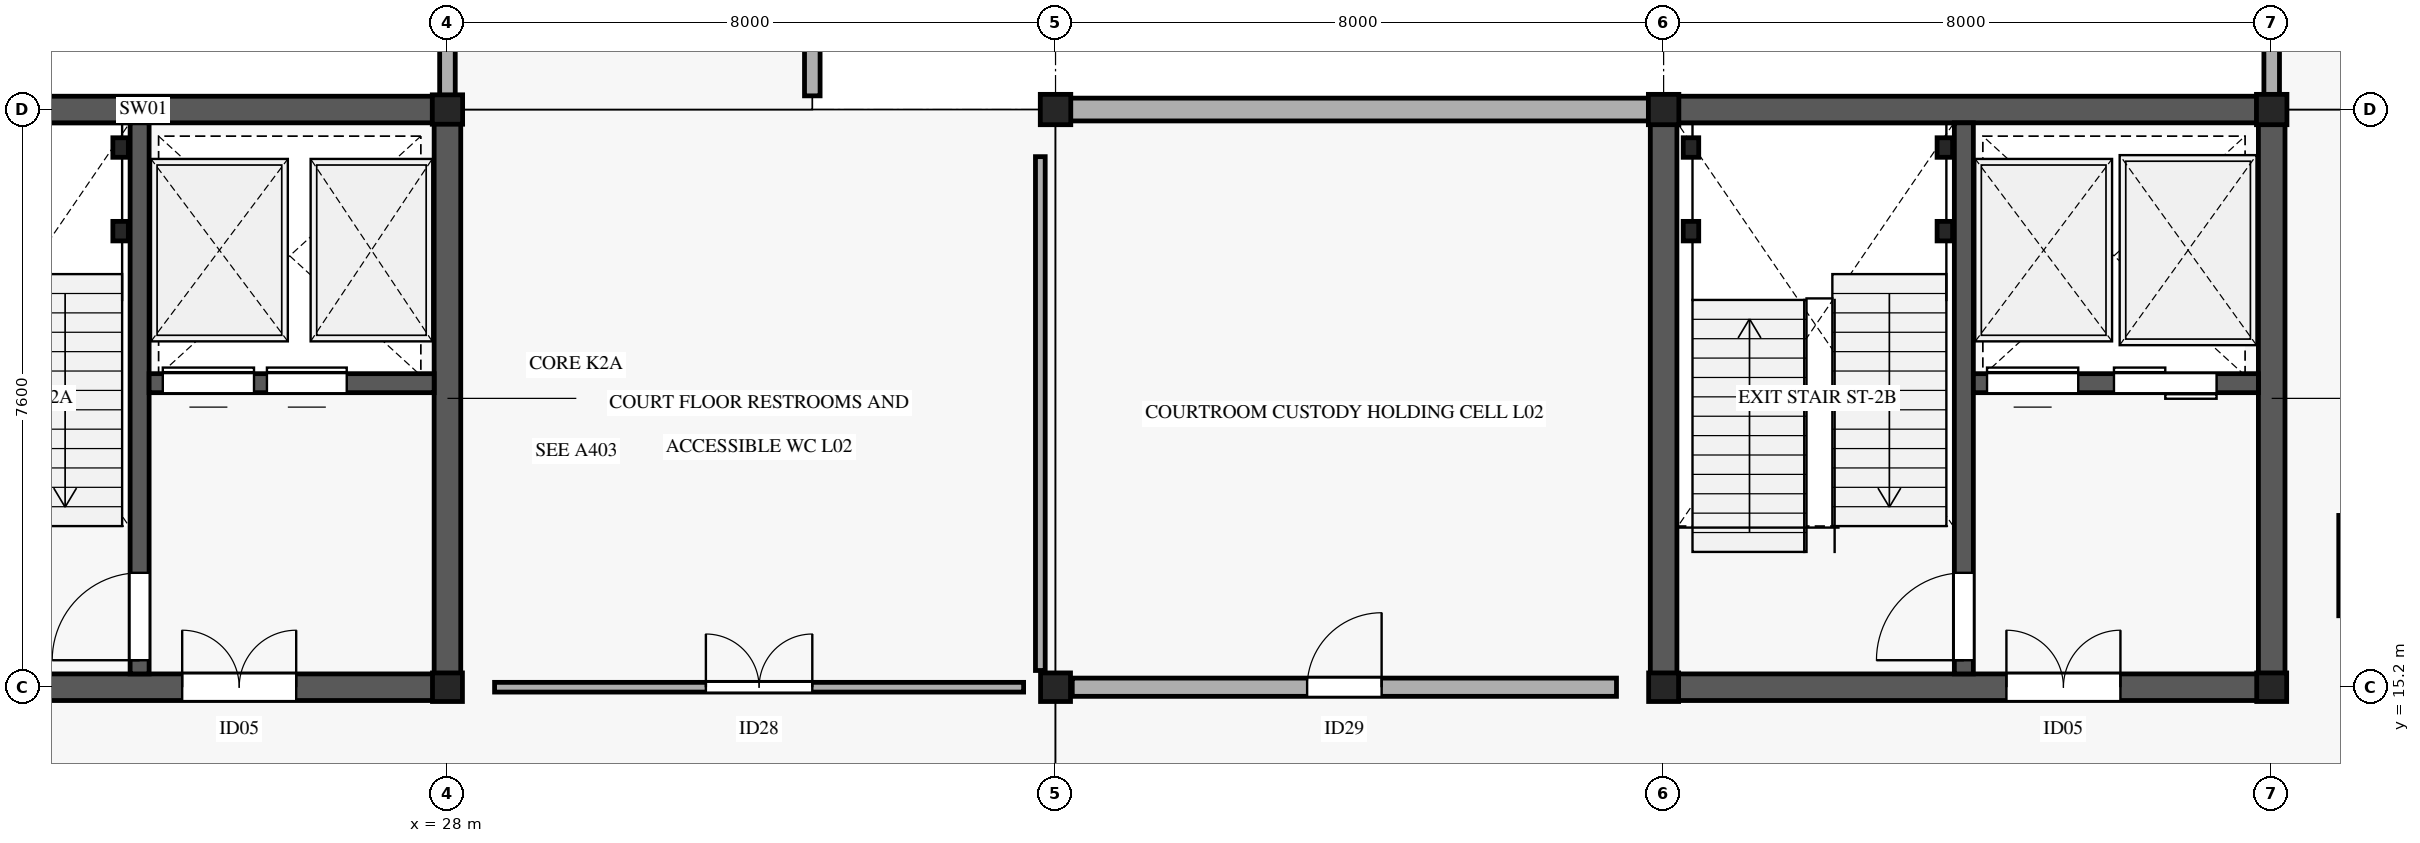
"""IFC4 building model, lengths in metres.
Left out: names, types, materials, properties, quantities, classifications, styles, units other than length and angle.
Written with IfcOpenShell. Run it as: python <this file> out.ifc"""

import sys

from ifc_helpers import new_model, si_unit, direction, frame, frame_2d, origin, origin_2d, place, context, subcontext, project, spatial, rectangle, i_section, extrude, element, fill, save


model = new_model("IFC4")
c1 = context("Model", 3, precision=1e-05, world=origin(), true_north=direction((0.0, 1.0)))
c2 = subcontext(c1, "Body", "Model", "MODEL_VIEW")
j1 = project(units=[si_unit("LENGTHUNIT", "METRE"), si_unit("PLANEANGLEUNIT", "RADIAN")], contexts=[c1])
p1 = place(None, origin())
s1 = spatial("IfcSite", under=j1, at=p1, CompositionType="ELEMENT")
p2 = place(p1, origin())
s2 = spatial("IfcBuilding", under=s1, at=p2, CompositionType="ELEMENT")
p3 = place(p2, frame((0.0, 0.0, 10.8)))
s3 = spatial("IfcBuildingStorey", under=s2, at=p3, CompositionType="ELEMENT", Elevation=10.8)
p4 = place(p3, frame((28.0, 15.2, 0.0), z_axis=(0.0, 0.0, 1.0), x_axis=(1.0, 0.0, 0.0)))
e1 = element("IfcColumn", 1, at=p4, inside=s3, PredefinedType="COLUMN", context=c2, shape_type="SweptSolid", body=[
    extrude(i_section(OverallWidth=0.394, OverallDepth=0.376, WebThickness=0.017, FlangeThickness=0.028, FilletRadius=0.015, at=origin_2d()), origin(), (0.0, 0.0, 1.0), 4.59),
])
p5 = place(p3, frame((28.0, 22.8, 0.0), z_axis=(0.0, 0.0, 1.0), x_axis=(1.0, 0.0, 0.0)))
e2 = element("IfcColumn", 2, at=p5, inside=s3, PredefinedType="COLUMN", context=c2, shape_type="SweptSolid", body=[
    extrude(i_section(OverallWidth=0.399, OverallDepth=0.387, WebThickness=0.021, FlangeThickness=0.033, FilletRadius=0.015, at=origin_2d()), origin(), (0.0, 0.0, 1.0), 4.59),
])
p6 = place(p3, frame((36.0, 15.2, 0.0), z_axis=(0.0, 0.0, 1.0), x_axis=(1.0, 0.0, 0.0)))
e3 = element("IfcColumn", 3, at=p6, inside=s3, PredefinedType="COLUMN", context=c2, shape_type="SweptSolid", body=[
    extrude(i_section(OverallWidth=0.394, OverallDepth=0.376, WebThickness=0.017, FlangeThickness=0.028, FilletRadius=0.015, at=origin_2d()), origin(), (0.0, 0.0, 1.0), 4.59),
])
p7 = place(p3, frame((36.0, 22.8, 0.0), z_axis=(0.0, 0.0, 1.0), x_axis=(1.0, 0.0, 0.0)))
e4 = element("IfcColumn", 4, at=p7, inside=s3, PredefinedType="COLUMN", context=c2, shape_type="SweptSolid", body=[
    extrude(i_section(OverallWidth=0.401, OverallDepth=0.399, WebThickness=0.025, FlangeThickness=0.04, FilletRadius=0.015, at=origin_2d()), origin(), (0.0, 0.0, 1.0), 4.59),
])
p8 = place(p3, frame((44.0, 15.2, 0.0), z_axis=(0.0, 0.0, 1.0), x_axis=(1.0, 0.0, 0.0)))
e5 = element("IfcColumn", 5, at=p8, inside=s3, PredefinedType="COLUMN", context=c2, shape_type="SweptSolid", body=[
    extrude(i_section(OverallWidth=0.394, OverallDepth=0.376, WebThickness=0.017, FlangeThickness=0.028, FilletRadius=0.015, at=origin_2d()), origin(), (0.0, 0.0, 1.0), 4.59),
])
p9 = place(p3, frame((44.0, 22.8, 0.0), z_axis=(0.0, 0.0, 1.0), x_axis=(1.0, 0.0, 0.0)))
e6 = element("IfcColumn", 6, at=p9, inside=s3, PredefinedType="COLUMN", context=c2, shape_type="SweptSolid", body=[
    extrude(i_section(OverallWidth=0.401, OverallDepth=0.399, WebThickness=0.025, FlangeThickness=0.04, FilletRadius=0.015, at=origin_2d()), origin(), (0.0, 0.0, 1.0), 4.59),
])
p10 = place(p3, frame((52.0, 15.2, 0.0), z_axis=(0.0, 0.0, 1.0), x_axis=(1.0, 0.0, 0.0)))
e7 = element("IfcColumn", 7, at=p10, inside=s3, PredefinedType="COLUMN", context=c2, shape_type="SweptSolid", body=[
    extrude(i_section(OverallWidth=0.394, OverallDepth=0.376, WebThickness=0.017, FlangeThickness=0.028, FilletRadius=0.015, at=origin_2d()), origin(), (0.0, 0.0, 1.0), 4.59),
])
p11 = place(p3, frame((52.0, 22.8, 0.0), z_axis=(0.0, 0.0, 1.0), x_axis=(1.0, 0.0, 0.0)))
e8 = element("IfcColumn", 8, at=p11, inside=s3, PredefinedType="COLUMN", context=c2, shape_type="SweptSolid", body=[
    extrude(i_section(OverallWidth=0.401, OverallDepth=0.399, WebThickness=0.025, FlangeThickness=0.04, FilletRadius=0.015, at=origin_2d()), origin(), (0.0, 0.0, 1.0), 4.59),
])
p12 = place(p3, frame((35.98, 22.8, 0.0), z_axis=(0.0, 0.0, 1.0), x_axis=(1.0, 0.0, 0.0)))
e9 = element("IfcWall", 9, at=p12, inside=s3, PredefinedType="STANDARD", context=c2, shape_type="SweptSolid", body=[
    extrude(rectangle(XDim=8.04, YDim=0.3, at=frame_2d((4.02, 0.0))), origin(), (0.0, 0.0, 1.0), 3.46),
])
p13 = place(p3, frame((28.0, 22.98, 0.0), z_axis=(0.0, 0.0, 1.0), x_axis=(0.0, 1.0, 0.0)))
e10 = element("IfcWall", 10, at=p13, inside=s3, PredefinedType="STANDARD", context=c2, shape_type="SweptSolid", body=[
    extrude(rectangle(XDim=22.84, YDim=0.205, at=frame_2d((11.42, 0.0))), origin(), (0.0, 0.0, 1.0), 4.02),
])
p14 = place(p13, frame((10.195, 0.0, 0.85)))
e11 = element("IfcOpeningElement", 11, at=p14, cuts=e10, PredefinedType="OPENING", context=c2, shape_type="SweptSolid", body=[
    extrude(rectangle(XDim=2.45, YDim=1.55, at=frame_2d((1.225, 0.775))), frame((0.0, 0.113, 0.0), z_axis=(0.0, -1.0, 0.0), x_axis=(1.0, 0.0, 0.0)), (0.0, 0.0, 1.0), 0.225),
])
p15 = place(p3, frame((32.8, 45.82, 0.0), z_axis=(0.0, 0.0, 1.0), x_axis=(0.0, -1.0, 0.0)))
e12 = element("IfcWall", 12, at=p15, inside=s3, PredefinedType="STANDARD", context=c2, shape_type="SweptSolid", body=[
    extrude(rectangle(XDim=22.84, YDim=0.205, at=frame_2d((11.42, 0.0))), origin(), (0.0, 0.0, 1.0), 4.02),
])
p16 = place(p15, frame((10.195, 0.0, 0.85)))
e13 = element("IfcOpeningElement", 13, at=p16, cuts=e12, PredefinedType="OPENING", context=c2, shape_type="SweptSolid", body=[
    extrude(rectangle(XDim=2.45, YDim=1.55, at=frame_2d((1.225, 0.775))), frame((0.0, 0.113, 0.0), z_axis=(0.0, -1.0, 0.0), x_axis=(1.0, 0.0, 0.0)), (0.0, 0.0, 1.0), 0.225),
])
p17 = place(p3, frame((52.0, 22.98, 0.0), z_axis=(0.0, 0.0, 1.0), x_axis=(0.0, 1.0, 0.0)))
e14 = element("IfcWall", 14, at=p17, inside=s3, PredefinedType="STANDARD", context=c2, shape_type="SweptSolid", body=[
    extrude(rectangle(XDim=22.84, YDim=0.205, at=frame_2d((11.42, 0.0))), origin(), (0.0, 0.0, 1.0), 4.02),
])
p18 = place(p17, frame((10.195, 0.0, 0.85)))
e15 = element("IfcOpeningElement", 15, at=p18, cuts=e14, PredefinedType="OPENING", context=c2, shape_type="SweptSolid", body=[
    extrude(rectangle(XDim=2.45, YDim=1.55, at=frame_2d((1.225, 0.775))), frame((0.0, 0.113, 0.0), z_axis=(0.0, -1.0, 0.0), x_axis=(1.0, 0.0, 0.0)), (0.0, 0.0, 1.0), 0.225),
])
p19 = place(p3, frame((52.94, 17.46, 0.0), z_axis=(0.0, 0.0, 1.0), x_axis=(0.0, -1.0, 0.0)))
e16 = element("IfcWall", 16, at=p19, inside=s3, PredefinedType="PARTITIONING", context=c2, shape_type="SweptSolid", body=[
    extrude(rectangle(XDim=1.32, YDim=0.115, at=frame_2d((0.66, 0.0))), origin(), (0.0, 0.0, 1.0), 3.75),
])
p20 = place(p3, frame((19.825, 15.2, 0.0), z_axis=(0.0, 0.0, 1.0), x_axis=(1.0, 0.0, 0.0)))
e17 = element("IfcWall", 17, at=p20, inside=s3, PredefinedType="SHEAR", context=c2, shape_type="SweptSolid", body=[
    extrude(rectangle(XDim=8.35, YDim=0.35, at=frame_2d((4.175, 0.0))), origin(), (0.0, 0.0, 1.0), 4.59),
])
p21 = place(p20, frame((4.685, 0.0, 0.0)))
e18 = element("IfcOpeningElement", 18, at=p21, cuts=e17, PredefinedType="OPENING", context=c2, shape_type="SweptSolid", body=[
    extrude(rectangle(XDim=1.5, YDim=2.2, at=frame_2d((0.75, 1.1))), frame((0.0, 0.185, 0.0), z_axis=(0.0, -1.0, 0.0), x_axis=(1.0, 0.0, 0.0)), (0.0, 0.0, 1.0), 0.37),
])
p22 = place(p3, frame((19.825, 22.8, 0.0), z_axis=(0.0, 0.0, 1.0), x_axis=(1.0, 0.0, 0.0)))
e19 = element("IfcWall", 19, at=p22, inside=s3, PredefinedType="SHEAR", context=c2, shape_type="SweptSolid", body=[
    extrude(rectangle(XDim=8.35, YDim=0.35, at=frame_2d((4.175, 0.0))), origin(), (0.0, 0.0, 1.0), 4.59),
])
p23 = place(p3, frame((28.0, 15.375, 0.0), z_axis=(0.0, 0.0, 1.0), x_axis=(0.0, 1.0, 0.0)))
e20 = element("IfcWall", 20, at=p23, inside=s3, PredefinedType="SHEAR", context=c2, shape_type="SweptSolid", body=[
    extrude(rectangle(XDim=7.25, YDim=0.35, at=frame_2d((3.625, 0.0))), origin(), (0.0, 0.0, 1.0), 4.59),
])
p24 = place(p3, frame((23.95, 15.375, 0.0), z_axis=(0.0, 0.0, 1.0), x_axis=(0.0, 1.0, 0.0)))
e21 = element("IfcWall", 21, at=p24, inside=s3, PredefinedType="SHEAR", context=c2, shape_type="SweptSolid", body=[
    extrude(rectangle(XDim=7.25, YDim=0.25, at=frame_2d((3.625, 0.0))), origin(), (0.0, 0.0, 1.0), 4.59),
])
p25 = place(p24, frame((0.18, 0.0, 0.0)))
e22 = element("IfcOpeningElement", 22, at=p25, cuts=e21, PredefinedType="OPENING", context=c2, shape_type="SweptSolid", body=[
    extrude(rectangle(XDim=1.15, YDim=2.2, at=frame_2d((0.575, 1.1))), frame((0.0, 0.135, 0.0), z_axis=(0.0, -1.0, 0.0), x_axis=(1.0, 0.0, 0.0)), (0.0, 0.0, 1.0), 0.27),
])
p26 = place(p3, frame((24.075, 19.2, 0.0), z_axis=(0.0, 0.0, 1.0), x_axis=(1.0, 0.0, 0.0)))
e23 = element("IfcWall", 23, at=p26, inside=s3, PredefinedType="SHEAR", context=c2, shape_type="SweptSolid", body=[
    extrude(rectangle(XDim=3.75, YDim=0.25, at=frame_2d((1.875, 0.0))), origin(), (0.0, 0.0, 1.0), 4.59),
])
p27 = place(p26, frame((0.18, 0.0, 0.0)))
e24 = element("IfcOpeningElement", 24, at=p27, cuts=e23, PredefinedType="OPENING", context=c2, shape_type="SweptSolid", body=[
    extrude(rectangle(XDim=1.2, YDim=2.2, at=frame_2d((0.6, 1.1))), frame((0.0, 0.135, 0.0), z_axis=(0.0, -1.0, 0.0), x_axis=(1.0, 0.0, 0.0)), (0.0, 0.0, 1.0), 0.27),
])
p28 = place(p26, frame((1.55, 0.0, 0.0)))
e25 = element("IfcOpeningElement", 25, at=p28, cuts=e23, PredefinedType="OPENING", context=c2, shape_type="SweptSolid", body=[
    extrude(rectangle(XDim=1.05, YDim=2.2, at=frame_2d((0.525, 1.1))), frame((0.0, 0.135, 0.0), z_axis=(0.0, -1.0, 0.0), x_axis=(1.0, 0.0, 0.0)), (0.0, 0.0, 1.0), 0.27),
])
for number, where, z_axis, x_axis in (
    (26, (23.7, 21.2, 0.0), (0.0, 0.0, 1.0), (1.0, 0.0, 0.0)),
    (27, (23.7, 22.3, 0.0), (0.0, 0.0, 1.0), (1.0, 0.0, 0.0)),
):
    element("IfcColumn", number, at=place(p3, frame(where, z_axis=z_axis, x_axis=x_axis)), inside=s3, PredefinedType="COLUMN", context=c2, shape_type="SweptSolid", body=[
        extrude(i_section(OverallWidth=0.204, OverallDepth=0.257, WebThickness=0.009, FlangeThickness=0.016, FilletRadius=0.013, at=origin_2d()), origin(), (0.0, 0.0, 1.0), 4.795),
    ])
p29 = place(p3, frame((43.825, 15.2, 0.0), z_axis=(0.0, 0.0, 1.0), x_axis=(1.0, 0.0, 0.0)))
e28 = element("IfcWall", 28, at=p29, inside=s3, PredefinedType="SHEAR", context=c2, shape_type="SweptSolid", body=[
    extrude(rectangle(XDim=8.35, YDim=0.35, at=frame_2d((4.175, 0.0))), origin(), (0.0, 0.0, 1.0), 4.59),
])
p30 = place(p29, frame((4.685, 0.0, 0.0)))
e29 = element("IfcOpeningElement", 29, at=p30, cuts=e28, PredefinedType="OPENING", context=c2, shape_type="SweptSolid", body=[
    extrude(rectangle(XDim=1.5, YDim=2.2, at=frame_2d((0.75, 1.1))), frame((0.0, 0.185, 0.0), z_axis=(0.0, -1.0, 0.0), x_axis=(1.0, 0.0, 0.0)), (0.0, 0.0, 1.0), 0.37),
])
p31 = place(p3, frame((43.825, 22.8, 0.0), z_axis=(0.0, 0.0, 1.0), x_axis=(1.0, 0.0, 0.0)))
e30 = element("IfcWall", 30, at=p31, inside=s3, PredefinedType="SHEAR", context=c2, shape_type="SweptSolid", body=[
    extrude(rectangle(XDim=8.35, YDim=0.35, at=frame_2d((4.175, 0.0))), origin(), (0.0, 0.0, 1.0), 4.59),
])
for number, where, z_axis, x_axis in (
    (31, (44.0, 15.375, 0.0), (0.0, 0.0, 1.0), (0.0, 1.0, 0.0)),
    (32, (52.0, 15.375, 0.0), (0.0, 0.0, 1.0), (0.0, 1.0, 0.0)),
):
    element("IfcWall", number, at=place(p3, frame(where, z_axis=z_axis, x_axis=x_axis)), inside=s3, PredefinedType="SHEAR", context=c2, shape_type="SweptSolid", body=[
        extrude(rectangle(XDim=7.25, YDim=0.35, at=frame_2d((3.625, 0.0))), origin(), (0.0, 0.0, 1.0), 4.59),
    ])
p32 = place(p3, frame((47.95, 15.375, 0.0), z_axis=(0.0, 0.0, 1.0), x_axis=(0.0, 1.0, 0.0)))
e33 = element("IfcWall", 33, at=p32, inside=s3, PredefinedType="SHEAR", context=c2, shape_type="SweptSolid", body=[
    extrude(rectangle(XDim=7.25, YDim=0.25, at=frame_2d((3.625, 0.0))), origin(), (0.0, 0.0, 1.0), 4.59),
])
p33 = place(p32, frame((0.18, 0.0, 0.0)))
e34 = element("IfcOpeningElement", 34, at=p33, cuts=e33, PredefinedType="OPENING", context=c2, shape_type="SweptSolid", body=[
    extrude(rectangle(XDim=1.15, YDim=2.2, at=frame_2d((0.575, 1.1))), frame((0.0, 0.135, 0.0), z_axis=(0.0, -1.0, 0.0), x_axis=(1.0, 0.0, 0.0)), (0.0, 0.0, 1.0), 0.27),
])
p34 = place(p3, frame((48.075, 19.2, 0.0), z_axis=(0.0, 0.0, 1.0), x_axis=(1.0, 0.0, 0.0)))
e35 = element("IfcWall", 35, at=p34, inside=s3, PredefinedType="SHEAR", context=c2, shape_type="SweptSolid", body=[
    extrude(rectangle(XDim=3.75, YDim=0.25, at=frame_2d((1.875, 0.0))), origin(), (0.0, 0.0, 1.0), 4.59),
])
p35 = place(p34, frame((0.18, 0.0, 0.0)))
e36 = element("IfcOpeningElement", 36, at=p35, cuts=e35, PredefinedType="OPENING", context=c2, shape_type="SweptSolid", body=[
    extrude(rectangle(XDim=1.2, YDim=2.2, at=frame_2d((0.6, 1.1))), frame((0.0, 0.135, 0.0), z_axis=(0.0, -1.0, 0.0), x_axis=(1.0, 0.0, 0.0)), (0.0, 0.0, 1.0), 0.27),
])
p36 = place(p34, frame((1.85, 0.0, 0.0)))
e37 = element("IfcOpeningElement", 37, at=p36, cuts=e35, PredefinedType="OPENING", context=c2, shape_type="SweptSolid", body=[
    extrude(rectangle(XDim=1.35, YDim=2.2, at=frame_2d((0.675, 1.1))), frame((0.0, 0.135, 0.0), z_axis=(0.0, -1.0, 0.0), x_axis=(1.0, 0.0, 0.0)), (0.0, 0.0, 1.0), 0.27),
])
for number, where, z_axis, x_axis in (
    (38, (44.36, 21.2, 0.0), (0.0, 0.0, 1.0), (1.0, 0.0, 0.0)),
    (39, (47.7, 21.2, 0.0), (0.0, 0.0, 1.0), (1.0, 0.0, 0.0)),
    (40, (44.36, 22.3, 0.0), (0.0, 0.0, 1.0), (1.0, 0.0, 0.0)),
    (41, (47.7, 22.3, 0.0), (0.0, 0.0, 1.0), (1.0, 0.0, 0.0)),
):
    element("IfcColumn", number, at=place(p3, frame(where, z_axis=z_axis, x_axis=x_axis)), inside=s3, PredefinedType="COLUMN", context=c2, shape_type="SweptSolid", body=[
        extrude(i_section(OverallWidth=0.204, OverallDepth=0.257, WebThickness=0.009, FlangeThickness=0.016, FilletRadius=0.013, at=origin_2d()), origin(), (0.0, 0.0, 1.0), 4.795),
    ])
p37 = place(p3, frame((28.62, 15.2, 0.0), z_axis=(0.0, 0.0, 1.0), x_axis=(1.0, 0.0, 0.0)))
e42 = element("IfcWall", 42, at=p37, inside=s3, PredefinedType="PARTITIONING", context=c2, shape_type="SweptSolid", body=[
    extrude(rectangle(XDim=6.96, YDim=0.128, at=frame_2d((3.48, 0.0))), origin(), (0.0, 0.0, 1.0), 3.45),
])
p38 = place(p37, frame((2.78, 0.0, 0.0)))
e43 = element("IfcOpeningElement", 43, at=p38, cuts=e42, PredefinedType="OPENING", context=c2, shape_type="SweptSolid", body=[
    extrude(rectangle(XDim=1.4, YDim=2.3, at=frame_2d((0.7, 1.15))), frame((0.0, 0.074, 0.0), z_axis=(0.0, -1.0, 0.0), x_axis=(1.0, 0.0, 0.0)), (0.0, 0.0, 1.0), 0.148),
])
p39 = place(p3, frame((35.8, 15.42, 0.0), z_axis=(0.0, 0.0, 1.0), x_axis=(0.0, 1.0, 0.0)))
e44 = element("IfcWall", 44, at=p39, inside=s3, PredefinedType="PARTITIONING", context=c2, shape_type="SweptSolid", body=[
    extrude(rectangle(XDim=6.76, YDim=0.128, at=frame_2d((3.38, 0.0))), origin(), (0.0, 0.0, 1.0), 3.45),
])
p40 = place(p3, frame((36.22, 15.2, 0.0), z_axis=(0.0, 0.0, 1.0), x_axis=(1.0, 0.0, 0.0)))
e45 = element("IfcWall", 45, at=p40, inside=s3, PredefinedType="PARTITIONING", context=c2, shape_type="SweptSolid", body=[
    extrude(rectangle(XDim=7.16, YDim=0.24, at=frame_2d((3.58, 0.0))), origin(), (0.0, 0.0, 1.0), 3.45),
])
p41 = place(p40, frame((3.09, 0.0, 0.0)))
e46 = element("IfcOpeningElement", 46, at=p41, cuts=e45, PredefinedType="OPENING", context=c2, shape_type="SweptSolid", body=[
    extrude(rectangle(XDim=0.98, YDim=2.25, at=frame_2d((0.49, 1.125))), frame((0.0, 0.13, 0.0), z_axis=(0.0, -1.0, 0.0), x_axis=(1.0, 0.0, 0.0)), (0.0, 0.0, 1.0), 0.26),
])
p42 = place(p25, origin())
e47 = element("IfcDoor", 47, at=p42, inside=s3, OperationType="SINGLE_SWING_LEFT", PredefinedType="DOOR", context=c2, shape_type="SweptSolid", body=[
    extrude(rectangle(XDim=1.15, YDim=2.2, at=frame_2d((0.575, 1.1))), frame((0.0, 0.025, 0.0), z_axis=(0.0, -1.0, 0.0), x_axis=(1.0, 0.0, 0.0)), (0.0, 0.0, 1.0), 0.05),
])
fill(e22, e47)
p43 = place(p21, origin())
e48 = element("IfcDoor", 48, at=p43, inside=s3, OperationType="DOUBLE_DOOR_SINGLE_SWING", PredefinedType="DOOR", context=c2, shape_type="SweptSolid", body=[
    extrude(rectangle(XDim=1.5, YDim=2.2, at=frame_2d((0.75, 1.1))), frame((0.0, 0.025, 0.0), z_axis=(0.0, -1.0, 0.0), x_axis=(1.0, 0.0, 0.0)), (0.0, 0.0, 1.0), 0.05),
])
fill(e18, e48)
p44 = place(p27, origin())
e49 = element("IfcDoor", 49, at=p44, inside=s3, OperationType="SLIDING_TO_LEFT", PredefinedType="DOOR", context=c2, shape_type="SweptSolid", body=[
    extrude(rectangle(XDim=1.2, YDim=2.2, at=frame_2d((0.6, 1.1))), frame((0.0, 0.025, 0.0), z_axis=(0.0, -1.0, 0.0), x_axis=(1.0, 0.0, 0.0)), (0.0, 0.0, 1.0), 0.05),
])
fill(e24, e49)
p45 = place(p28, origin())
e50 = element("IfcDoor", 50, at=p45, inside=s3, OperationType="SLIDING_TO_RIGHT", PredefinedType="DOOR", context=c2, shape_type="SweptSolid", body=[
    extrude(rectangle(XDim=1.05, YDim=2.2, at=frame_2d((0.525, 1.1))), frame((0.0, 0.025, 0.0), z_axis=(0.0, -1.0, 0.0), x_axis=(1.0, 0.0, 0.0)), (0.0, 0.0, 1.0), 0.05),
])
fill(e25, e50)
p46 = place(p33, origin())
e51 = element("IfcDoor", 51, at=p46, inside=s3, OperationType="SINGLE_SWING_LEFT", PredefinedType="DOOR", context=c2, shape_type="SweptSolid", body=[
    extrude(rectangle(XDim=1.15, YDim=2.2, at=frame_2d((0.575, 1.1))), frame((0.0, 0.025, 0.0), z_axis=(0.0, -1.0, 0.0), x_axis=(1.0, 0.0, 0.0)), (0.0, 0.0, 1.0), 0.05),
])
fill(e34, e51)
p47 = place(p30, origin())
e52 = element("IfcDoor", 52, at=p47, inside=s3, OperationType="DOUBLE_DOOR_SINGLE_SWING", PredefinedType="DOOR", context=c2, shape_type="SweptSolid", body=[
    extrude(rectangle(XDim=1.5, YDim=2.2, at=frame_2d((0.75, 1.1))), frame((0.0, 0.025, 0.0), z_axis=(0.0, -1.0, 0.0), x_axis=(1.0, 0.0, 0.0)), (0.0, 0.0, 1.0), 0.05),
])
fill(e29, e52)
p48 = place(p35, origin())
e53 = element("IfcDoor", 53, at=p48, inside=s3, OperationType="SLIDING_TO_LEFT", PredefinedType="DOOR", context=c2, shape_type="SweptSolid", body=[
    extrude(rectangle(XDim=1.2, YDim=2.2, at=frame_2d((0.6, 1.1))), frame((0.0, 0.025, 0.0), z_axis=(0.0, -1.0, 0.0), x_axis=(1.0, 0.0, 0.0)), (0.0, 0.0, 1.0), 0.05),
])
fill(e36, e53)
p49 = place(p36, origin())
e54 = element("IfcDoor", 54, at=p49, inside=s3, OperationType="DOUBLE_DOOR_SLIDING", PredefinedType="DOOR", context=c2, shape_type="SweptSolid", body=[
    extrude(rectangle(XDim=1.35, YDim=2.2, at=frame_2d((0.675, 1.1))), frame((0.0, 0.025, 0.0), z_axis=(0.0, -1.0, 0.0), x_axis=(1.0, 0.0, 0.0)), (0.0, 0.0, 1.0), 0.05),
])
fill(e37, e54)
p50 = place(p38, origin())
e55 = element("IfcDoor", 55, at=p50, inside=s3, OperationType="DOUBLE_DOOR_SINGLE_SWING", PredefinedType="DOOR", context=c2, shape_type="SweptSolid", body=[
    extrude(rectangle(XDim=1.4, YDim=2.3, at=frame_2d((0.7, 1.15))), frame((0.0, 0.025, 0.0), z_axis=(0.0, -1.0, 0.0), x_axis=(1.0, 0.0, 0.0)), (0.0, 0.0, 1.0), 0.05),
])
fill(e43, e55)
p51 = place(p41, origin())
e56 = element("IfcDoor", 56, at=p51, inside=s3, OperationType="SINGLE_SWING_RIGHT", PredefinedType="DOOR", context=c2, shape_type="SweptSolid", body=[
    extrude(rectangle(XDim=0.98, YDim=2.25, at=frame_2d((0.49, 1.125))), frame((0.0, 0.025, 0.0), z_axis=(0.0, -1.0, 0.0), x_axis=(1.0, 0.0, 0.0)), (0.0, 0.0, 1.0), 0.05),
])
fill(e46, e56)
save(model, sys.argv[1])
